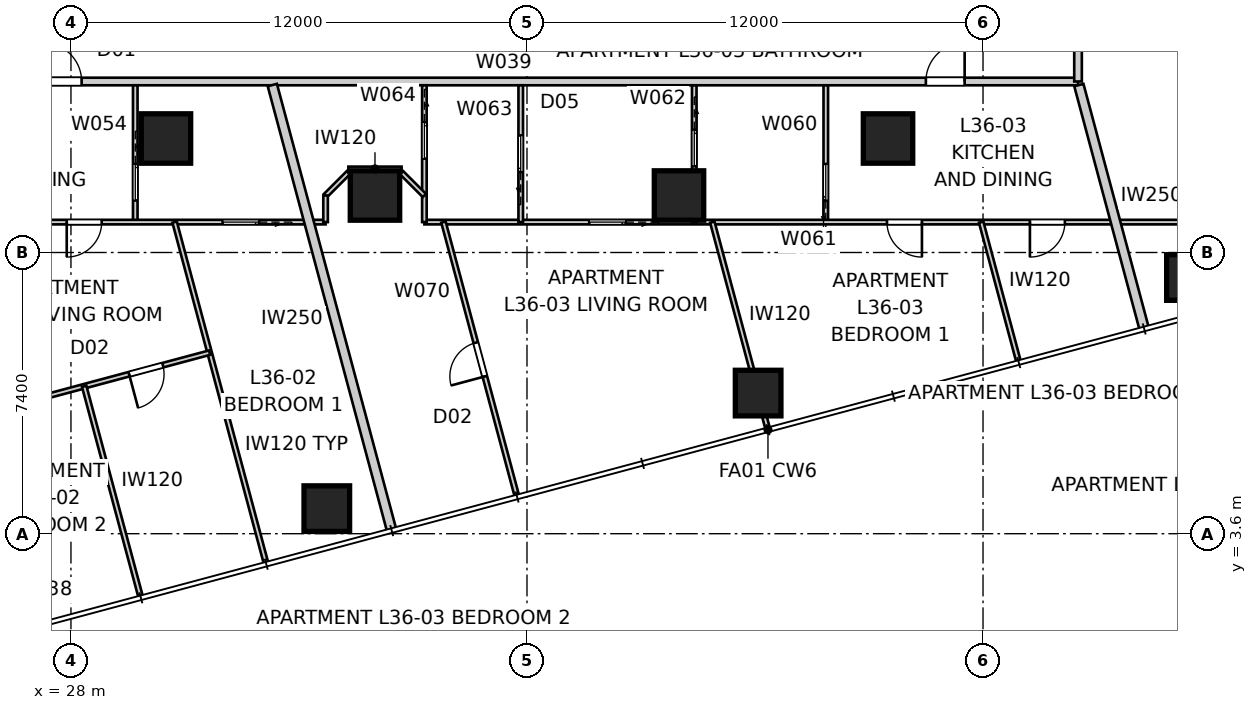
"""IFC4 building model, lengths in metres.
Left out: names, types, materials, properties, quantities, classifications, styles, units other than length and angle.
Written with IfcOpenShell. Run it as: python <this file> out.ifc"""

import sys

from ifc_helpers import new_model, si_unit, direction, frame, frame_2d, origin, origin_2d, place, context, subcontext, project, spatial, rectangle, extrude, element, fill, save


model = new_model("IFC4")
c1 = context("Model", 3, precision=1e-05, world=origin(), true_north=direction((0.0, 1.0)))
c2 = subcontext(c1, "Body", "Model", "MODEL_VIEW")
j1 = project(units=[si_unit("LENGTHUNIT", "METRE"), si_unit("PLANEANGLEUNIT", "RADIAN")], contexts=[c1])
p1 = place(None, origin())
s1 = spatial("IfcSite", under=j1, at=p1, CompositionType="ELEMENT")
p2 = place(p1, origin())
s2 = spatial("IfcBuilding", under=s1, at=p2, CompositionType="ELEMENT")
p3 = place(p2, frame((0.0, 0.0, 132.0)))
s3 = spatial("IfcBuildingStorey", under=s2, at=p3, CompositionType="ELEMENT", Elevation=132.0)
for number, where, z_axis, x_axis in (
    (1, (34.733, 4.26, 0.0), (0.0, 0.0, 1.0), (1.0, 0.0, 0.0)),
    (2, (46.082, 7.301, 0.0), (0.0, 0.0, 1.0), (1.0, 0.0, 0.0)),
    (3, (57.432, 10.342, 0.0), (0.0, 0.0, 1.0), (1.0, 0.0, 0.0)),
):
    element("IfcColumn", number, at=place(p3, frame(where, z_axis=z_axis, x_axis=x_axis)), inside=s3, PredefinedType="COLUMN", context=c2, shape_type="SweptSolid", body=[
        extrude(rectangle(XDim=1.2, YDim=1.2, at=origin_2d()), origin(), (0.0, 0.0, 1.0), 3.4),
    ])
for number, where, z_axis, x_axis in (
    (4, (30.5, 14.0, 0.0), (0.0, 0.0, 1.0), (1.0, 0.0, 0.0)),
    (5, (36.0, 12.5, 0.0), (0.0, 0.0, 1.0), (1.0, 0.0, 0.0)),
    (6, (44.0, 12.5, 0.0), (0.0, 0.0, 1.0), (1.0, 0.0, 0.0)),
    (7, (49.5, 14.0, 0.0), (0.0, 0.0, 1.0), (1.0, 0.0, 0.0)),
):
    element("IfcColumn", number, at=place(p3, frame(where, z_axis=z_axis, x_axis=x_axis)), inside=s3, PredefinedType="COLUMN", context=c2, shape_type="SweptSolid", body=[
        extrude(rectangle(XDim=1.3, YDim=1.3, at=origin_2d()), origin(), (0.0, 0.0, 1.0), 3.4),
    ])
p4 = place(p3, frame((25.5, 15.5, 0.0), z_axis=(0.0, 0.0, 1.0), x_axis=(1.0, 0.0, 0.0)))
e8 = element("IfcWall", 8, at=p4, inside=s3, PredefinedType="PARTITIONING", context=c2, shape_type="SweptSolid", body=[
    extrude(rectangle(XDim=29.0, YDim=0.2, at=frame_2d((14.5, 0.0))), origin(), (0.0, 0.0, 1.0), 3.25),
])
p5 = place(p4, frame((24.996, 0.0, 0.0)))
e9 = element("IfcOpeningElement", 9, at=p5, cuts=e8, PredefinedType="OPENING", context=c2, shape_type="SweptSolid", body=[
    extrude(rectangle(XDim=1.02, YDim=2.1, at=frame_2d((0.51, 1.05))), frame((0.0, 0.11, 0.0), z_axis=(0.0, -1.0, 0.0), x_axis=(1.0, 0.0, 0.0)), (0.0, 0.0, 1.0), 0.22),
])
p6 = place(p4, frame((1.761, 0.0, 0.0)))
e10 = element("IfcOpeningElement", 10, at=p6, cuts=e8, PredefinedType="OPENING", context=c2, shape_type="SweptSolid", body=[
    extrude(rectangle(XDim=1.02, YDim=2.34, at=frame_2d((0.51, 1.17))), frame((0.0, 0.11, 0.0), z_axis=(0.0, -1.0, 0.0), x_axis=(1.0, 0.0, 0.0)), (0.0, 0.0, 1.0), 0.22),
])
p7 = place(p3, frame((54.5, 15.5, 0.0), z_axis=(0.0, 0.0, 1.0), x_axis=(0.0, 1.0, 0.0)))
e11 = element("IfcWall", 11, at=p7, inside=s3, PredefinedType="PARTITIONING", context=c2, shape_type="SweptSolid", body=[
    extrude(rectangle(XDim=28.2, YDim=0.2, at=frame_2d((14.1, 0.0))), origin(), (0.0, 0.0, 1.0), 3.25),
])
p8 = place(p7, frame((21.527, 0.0, 0.0)))
e12 = element("IfcOpeningElement", 12, at=p8, cuts=e11, PredefinedType="OPENING", context=c2, shape_type="SweptSolid", body=[
    extrude(rectangle(XDim=1.02, YDim=2.34, at=frame_2d((0.51, 1.17))), frame((0.0, 0.11, 0.0), z_axis=(0.0, -1.0, 0.0), x_axis=(1.0, 0.0, 0.0)), (0.0, 0.0, 1.0), 0.22),
])
p9 = place(p7, frame((3.256, 0.0, 0.0)))
e13 = element("IfcOpeningElement", 13, at=p9, cuts=e11, PredefinedType="OPENING", context=c2, shape_type="SweptSolid", body=[
    extrude(rectangle(XDim=1.02, YDim=2.1, at=frame_2d((0.51, 1.05))), frame((0.0, 0.11, 0.0), z_axis=(0.0, -1.0, 0.0), x_axis=(1.0, 0.0, 0.0)), (0.0, 0.0, 1.0), 0.22),
])
p10 = place(p7, frame((26.127, 0.0, 0.0)))
e14 = element("IfcOpeningElement", 14, at=p10, cuts=e11, PredefinedType="OPENING", context=c2, shape_type="SweptSolid", body=[
    extrude(rectangle(XDim=1.02, YDim=2.34, at=frame_2d((0.51, 1.17))), frame((0.0, 0.11, 0.0), z_axis=(0.0, -1.0, 0.0), x_axis=(1.0, 0.0, 0.0)), (0.0, 0.0, 1.0), 0.22),
])
p11 = place(p3, frame((36.44, 3.682, 0.0), z_axis=(0.0, 0.0, 1.0), x_axis=(-0.258824223352, 0.965924438766, 0.0)))
e15 = element("IfcWall", 15, at=p11, inside=s3, PredefinedType="PARTITIONING", context=c2, shape_type="SweptSolid", body=[
    extrude(rectangle(XDim=12.138, YDim=0.25, at=frame_2d((6.069, 0.0))), origin(), (0.0, 0.0, 1.0), 3.25),
])
p12 = place(p3, frame((56.242, 8.988, 0.0), z_axis=(0.0, 0.0, 1.0), x_axis=(-0.25880587229, 0.965929355837, 0.0)))
e16 = element("IfcWall", 16, at=p12, inside=s3, PredefinedType="PARTITIONING", context=c2, shape_type="SweptSolid", body=[
    extrude(rectangle(XDim=6.645, YDim=0.25, at=frame_2d((3.322, 0.0))), origin(), (0.0, 0.0, 1.0), 3.25),
])
p13 = place(p3, frame((29.692, 15.4, 0.0), z_axis=(0.0, 0.0, 1.0), x_axis=(0.0, -1.0, 0.0)))
e17 = element("IfcWall", 17, at=p13, inside=s3, PredefinedType="PARTITIONING", context=c2, shape_type="SweptSolid", body=[
    extrude(rectangle(XDim=3.6, YDim=0.12, at=frame_2d((1.8, 0.0))), origin(), (0.0, 0.0, 1.0), 3.25),
])
p14 = place(p13, frame((2.07, 0.0, 0.0)))
e18 = element("IfcOpeningElement", 18, at=p14, cuts=e17, PredefinedType="OPENING", context=c2, shape_type="SweptSolid", body=[
    extrude(rectangle(XDim=0.96, YDim=2.1, at=frame_2d((0.48, 1.05))), frame((0.0, 0.07, 0.0), z_axis=(0.0, -1.0, 0.0), x_axis=(1.0, 0.0, 0.0)), (0.0, 0.0, 1.0), 0.14),
])
p15 = place(p3, frame((34.7, 11.8, 0.0), z_axis=(0.0, 0.0, 1.0), x_axis=(-1.0, 0.0, 0.0)))
e19 = element("IfcWall", 19, at=p15, inside=s3, PredefinedType="PARTITIONING", context=c2, shape_type="SweptSolid", body=[
    extrude(rectangle(XDim=12.9, YDim=0.12, at=frame_2d((6.45, 0.0))), origin(), (0.0, 0.0, 1.0), 2.637),
])
p16 = place(p15, frame((11.294, 0.0, 0.0)))
e20 = element("IfcOpeningElement", 20, at=p16, cuts=e19, PredefinedType="OPENING", context=c2, shape_type="SweptSolid", body=[
    extrude(rectangle(XDim=0.92, YDim=2.34, at=frame_2d((0.46, 1.17))), frame((0.0, 0.07, 0.0), z_axis=(0.0, -1.0, 0.0), x_axis=(1.0, 0.0, 0.0)), (0.0, 0.0, 1.0), 0.14),
])
p17 = place(p15, frame((5.891, 0.0, 0.0)))
e21 = element("IfcOpeningElement", 21, at=p17, cuts=e19, PredefinedType="OPENING", context=c2, shape_type="SweptSolid", body=[
    extrude(rectangle(XDim=0.92, YDim=2.34, at=frame_2d((0.46, 1.17))), frame((0.0, 0.07, 0.0), z_axis=(0.0, -1.0, 0.0), x_axis=(1.0, 0.0, 0.0)), (0.0, 0.0, 1.0), 0.14),
])
p18 = place(p15, frame((1.75, 0.0, 0.0)))
e22 = element("IfcOpeningElement", 22, at=p18, cuts=e19, PredefinedType="OPENING", context=c2, shape_type="SweptSolid", body=[
    extrude(rectangle(XDim=0.96, YDim=2.1, at=frame_2d((0.48, 1.05))), frame((0.0, 0.07, 0.0), z_axis=(0.0, -1.0, 0.0), x_axis=(1.0, 0.0, 0.0)), (0.0, 0.0, 1.0), 0.14),
])
p19 = place(p3, frame((30.728, 11.8, 0.0), z_axis=(0.0, 0.0, 1.0), x_axis=(0.258818491613, -0.965925974596, 0.0)))
e23 = element("IfcWall", 23, at=p19, inside=s3, PredefinedType="PARTITIONING", context=c2, shape_type="SweptSolid", body=[
    extrude(rectangle(XDim=9.28, YDim=0.12, at=frame_2d((4.64, 0.0))), origin(), (0.0, 0.0, 1.0), 2.721),
])
p20 = place(p3, frame((31.648, 8.365, 0.0), z_axis=(0.0, 0.0, 1.0), x_axis=(-0.965925636365, -0.258819753906, 0.0)))
e24 = element("IfcWall", 24, at=p20, inside=s3, PredefinedType="PARTITIONING", context=c2, shape_type="SweptSolid", body=[
    extrude(rectangle(XDim=10.793, YDim=0.12, at=frame_2d((5.396, 0.0))), origin(), (0.0, 0.0, 1.0), 3.25),
])
p21 = place(p20, frame((6.64, 0.0, 0.0)))
e25 = element("IfcOpeningElement", 25, at=p21, cuts=e24, PredefinedType="OPENING", context=c2, shape_type="SweptSolid", body=[
    extrude(rectangle(XDim=0.92, YDim=2.34, at=frame_2d((0.46, 1.17))), frame((0.0, 0.07, 0.0), z_axis=(0.0, -1.0, 0.0), x_axis=(1.0, 0.0, 0.0)), (0.0, 0.0, 1.0), 0.14),
])
p22 = place(p20, frame((1.273, 0.0, 0.0)))
e26 = element("IfcOpeningElement", 26, at=p22, cuts=e24, PredefinedType="OPENING", context=c2, shape_type="SweptSolid", body=[
    extrude(rectangle(XDim=0.92, YDim=2.34, at=frame_2d((0.46, 1.17))), frame((0.0, 0.07, 0.0), z_axis=(0.0, -1.0, 0.0), x_axis=(1.0, 0.0, 0.0)), (0.0, 0.0, 1.0), 0.14),
])
p23 = place(p3, frame((28.348, 7.48, 0.0), z_axis=(0.0, 0.0, 1.0), x_axis=(0.258830607795, -0.965922728001, 0.0)))
e27 = element("IfcWall", 27, at=p23, inside=s3, PredefinedType="PARTITIONING", context=c2, shape_type="SweptSolid", body=[
    extrude(rectangle(XDim=5.724, YDim=0.12, at=frame_2d((2.862, 0.0))), origin(), (0.0, 0.0, 1.0), 3.25),
])
p24 = place(p3, frame((47.862, 11.8, 0.0), z_axis=(0.0, 0.0, 1.0), x_axis=(0.0, 1.0, 0.0)))
e28 = element("IfcWall", 28, at=p24, inside=s3, PredefinedType="PARTITIONING", context=c2, shape_type="SweptSolid", body=[
    extrude(rectangle(XDim=3.6, YDim=0.12, at=frame_2d((1.8, 0.0))), origin(), (0.0, 0.0, 1.0), 3.25),
])
p25 = place(p24, frame((0.57, 0.0, 0.0)))
e29 = element("IfcOpeningElement", 29, at=p25, cuts=e28, PredefinedType="OPENING", context=c2, shape_type="SweptSolid", body=[
    extrude(rectangle(XDim=0.96, YDim=2.1, at=frame_2d((0.48, 1.05))), frame((0.0, 0.07, 0.0), z_axis=(0.0, -1.0, 0.0), x_axis=(1.0, 0.0, 0.0)), (0.0, 0.0, 1.0), 0.14),
])
p26 = place(p3, frame((58.2, 11.8, 0.0), z_axis=(0.0, 0.0, 1.0), x_axis=(-1.0, 0.0, 0.0)))
e30 = element("IfcWall", 30, at=p26, inside=s3, PredefinedType="PARTITIONING", context=c2, shape_type="SweptSolid", body=[
    extrude(rectangle(XDim=20.9, YDim=0.12, at=frame_2d((10.45, 0.0))), origin(), (0.0, 0.0, 1.0), 3.25),
])
p27 = place(p26, frame((7.807, 0.0, 0.0)))
e31 = element("IfcOpeningElement", 31, at=p27, cuts=e30, PredefinedType="OPENING", context=c2, shape_type="SweptSolid", body=[
    extrude(rectangle(XDim=0.92, YDim=2.34, at=frame_2d((0.46, 1.17))), frame((0.0, 0.07, 0.0), z_axis=(0.0, -1.0, 0.0), x_axis=(1.0, 0.0, 0.0)), (0.0, 0.0, 1.0), 0.14),
])
p28 = place(p26, frame((4.046, 0.0, 0.0)))
e32 = element("IfcOpeningElement", 32, at=p28, cuts=e30, PredefinedType="OPENING", context=c2, shape_type="SweptSolid", body=[
    extrude(rectangle(XDim=0.92, YDim=2.34, at=frame_2d((0.46, 1.17))), frame((0.0, 0.07, 0.0), z_axis=(0.0, -1.0, 0.0), x_axis=(1.0, 0.0, 0.0)), (0.0, 0.0, 1.0), 0.14),
])
p29 = place(p26, frame((15.602, 0.0, 0.0)))
e33 = element("IfcOpeningElement", 33, at=p29, cuts=e30, PredefinedType="OPENING", context=c2, shape_type="SweptSolid", body=[
    extrude(rectangle(XDim=0.96, YDim=2.1, at=frame_2d((0.48, 1.05))), frame((0.0, 0.07, 0.0), z_axis=(0.0, -1.0, 0.0), x_axis=(1.0, 0.0, 0.0)), (0.0, 0.0, 1.0), 0.14),
])
p30 = place(p3, frame((44.401, 15.4, 0.0), z_axis=(0.0, 0.0, 1.0), x_axis=(0.0, -1.0, 0.0)))
e34 = element("IfcWall", 34, at=p30, inside=s3, PredefinedType="PARTITIONING", context=c2, shape_type="SweptSolid", body=[
    extrude(rectangle(XDim=3.6, YDim=0.12, at=frame_2d((1.8, 0.0))), origin(), (0.0, 0.0, 1.0), 3.25),
])
p31 = place(p30, frame((1.17, 0.0, 0.0)))
e35 = element("IfcOpeningElement", 35, at=p31, cuts=e34, PredefinedType="OPENING", context=c2, shape_type="SweptSolid", body=[
    extrude(rectangle(XDim=0.96, YDim=2.1, at=frame_2d((0.48, 1.05))), frame((0.0, 0.07, 0.0), z_axis=(0.0, -1.0, 0.0), x_axis=(1.0, 0.0, 0.0)), (0.0, 0.0, 1.0), 0.14),
])
p32 = place(p3, frame((39.835, 11.8, 0.0), z_axis=(0.0, 0.0, 1.0), x_axis=(0.0, 1.0, 0.0)))
e36 = element("IfcWall", 36, at=p32, inside=s3, PredefinedType="PARTITIONING", context=c2, shape_type="SweptSolid", body=[
    extrude(rectangle(XDim=3.6, YDim=0.12, at=frame_2d((1.8, 0.0))), origin(), (0.0, 0.0, 1.0), 3.25),
])
p33 = place(p32, frame((1.32, 0.0, 0.0)))
e37 = element("IfcOpeningElement", 37, at=p33, cuts=e36, PredefinedType="OPENING", context=c2, shape_type="SweptSolid", body=[
    extrude(rectangle(XDim=0.96, YDim=2.1, at=frame_2d((0.48, 1.05))), frame((0.0, 0.07, 0.0), z_axis=(0.0, -1.0, 0.0), x_axis=(1.0, 0.0, 0.0)), (0.0, 0.0, 1.0), 0.14),
])
p34 = place(p3, frame((37.3, 15.4, 0.0), z_axis=(0.0, 0.0, 1.0), x_axis=(0.0, -1.0, 0.0)))
e38 = element("IfcWall", 38, at=p34, inside=s3, PredefinedType="PARTITIONING", context=c2, shape_type="SweptSolid", body=[
    extrude(rectangle(XDim=3.6, YDim=0.12, at=frame_2d((1.8, 0.0))), origin(), (0.0, 0.0, 1.0), 3.25),
])
p35 = place(p34, frame((0.97, 0.0, 0.0)))
e39 = element("IfcOpeningElement", 39, at=p35, cuts=e38, PredefinedType="OPENING", context=c2, shape_type="SweptSolid", body=[
    extrude(rectangle(XDim=0.96, YDim=2.1, at=frame_2d((0.48, 1.05))), frame((0.0, 0.07, 0.0), z_axis=(0.0, -1.0, 0.0), x_axis=(1.0, 0.0, 0.0)), (0.0, 0.0, 1.0), 0.14),
])
p36 = place(p3, frame((37.3, 12.5, 0.0), z_axis=(0.0, 0.0, 1.0), x_axis=(-0.707106781187, 0.707106781187, 0.0)))
e40 = element("IfcWall", 40, at=p36, inside=s3, PredefinedType="PARTITIONING", context=c2, shape_type="SweptSolid", body=[
    extrude(rectangle(XDim=0.849, YDim=0.12, at=frame_2d((0.424, 0.0))), origin(), (0.0, 0.0, 1.0), 3.25),
])
p37 = place(p3, frame((36.7, 13.2, 0.0), z_axis=(0.0, 0.0, 1.0), x_axis=(-1.0, 0.0, 0.0)))
e41 = element("IfcWall", 41, at=p37, inside=s3, PredefinedType="PARTITIONING", context=c2, shape_type="SweptSolid", body=[
    extrude(rectangle(XDim=1.4, YDim=0.12, at=frame_2d((0.7, 0.0))), origin(), (0.0, 0.0, 1.0), 3.25),
])
p38 = place(p3, frame((35.3, 13.1, 0.0), z_axis=(0.0, 0.0, 1.0), x_axis=(-0.707106781187, -0.707106781187, 0.0)))
e42 = element("IfcWall", 42, at=p38, inside=s3, PredefinedType="PARTITIONING", context=c2, shape_type="SweptSolid", body=[
    extrude(rectangle(XDim=0.849, YDim=0.12, at=frame_2d((0.424, 0.0))), origin(), (0.0, 0.0, 1.0), 3.25),
])
p39 = place(p3, frame((34.7, 12.5, 0.0), z_axis=(0.0, 0.0, 1.0), x_axis=(0.0, -1.0, 0.0)))
e43 = element("IfcWall", 43, at=p39, inside=s3, PredefinedType="PARTITIONING", context=c2, shape_type="SweptSolid", body=[
    extrude(rectangle(XDim=0.7, YDim=0.12, at=frame_2d((0.35, 0.0))), origin(), (0.0, 0.0, 1.0), 2.721),
])
p40 = place(p3, frame((44.877, 11.8, 0.0), z_axis=(0.0, 0.0, 1.0), x_axis=(0.258830937246, -0.96592263972, 0.0)))
e44 = element("IfcWall", 44, at=p40, inside=s3, PredefinedType="PARTITIONING", context=c2, shape_type="SweptSolid", body=[
    extrude(rectangle(XDim=5.618, YDim=0.12, at=frame_2d((2.809, 0.0))), origin(), (0.0, 0.0, 1.0), 3.25),
])
p41 = place(p3, frame((39.73, 4.605, 0.0), z_axis=(0.0, 0.0, 1.0), x_axis=(-0.258819087933, 0.965925814813, 0.0)))
e45 = element("IfcWall", 45, at=p41, inside=s3, PredefinedType="PARTITIONING", context=c2, shape_type="SweptSolid", body=[
    extrude(rectangle(XDim=7.449, YDim=0.12, at=frame_2d((3.725, 0.0))), origin(), (0.0, 0.0, 1.0), 3.25),
])
p42 = place(p41, frame((3.244, 0.0, 0.0)))
e46 = element("IfcOpeningElement", 46, at=p42, cuts=e45, PredefinedType="OPENING", context=c2, shape_type="SweptSolid", body=[
    extrude(rectangle(XDim=0.92, YDim=2.34, at=frame_2d((0.46, 1.17))), frame((0.0, 0.07, 0.0), z_axis=(0.0, -1.0, 0.0), x_axis=(1.0, 0.0, 0.0)), (0.0, 0.0, 1.0), 0.14),
])
p43 = place(p3, frame((51.951, 11.8, 0.0), z_axis=(0.0, 0.0, 1.0), x_axis=(0.258777977267, -0.965936829447, 0.0)))
e47 = element("IfcWall", 47, at=p43, inside=s3, PredefinedType="PARTITIONING", context=c2, shape_type="SweptSolid", body=[
    extrude(rectangle(XDim=3.787, YDim=0.12, at=frame_2d((1.894, 0.0))), origin(), (0.0, 0.0, 1.0), 3.25),
])
p44 = place(p5, origin())
e48 = element("IfcDoor", 48, at=p44, inside=s3, OperationType="SINGLE_SWING_RIGHT", PredefinedType="DOOR", context=c2, shape_type="SweptSolid", body=[
    extrude(rectangle(XDim=1.02, YDim=2.1, at=frame_2d((0.51, 1.05))), frame((0.0, 0.025, 0.0), z_axis=(0.0, -1.0, 0.0), x_axis=(1.0, 0.0, 0.0)), (0.0, 0.0, 1.0), 0.05),
])
fill(e9, e48)
p45 = place(p6, origin())
e49 = element("IfcDoor", 49, at=p45, inside=s3, OperationType="SINGLE_SWING_LEFT", PredefinedType="DOOR", context=c2, shape_type="SweptSolid", body=[
    extrude(rectangle(XDim=1.02, YDim=2.34, at=frame_2d((0.51, 1.17))), frame((0.0, 0.025, 0.0), z_axis=(0.0, -1.0, 0.0), x_axis=(1.0, 0.0, 0.0)), (0.0, 0.0, 1.0), 0.05),
])
fill(e10, e49)
p46 = place(p27, origin())
e50 = element("IfcDoor", 50, at=p46, inside=s3, OperationType="SINGLE_SWING_LEFT", PredefinedType="DOOR", context=c2, shape_type="SweptSolid", body=[
    extrude(rectangle(XDim=0.92, YDim=2.34, at=frame_2d((0.46, 1.17))), frame((0.0, 0.025, 0.0), z_axis=(0.0, -1.0, 0.0), x_axis=(1.0, 0.0, 0.0)), (0.0, 0.0, 1.0), 0.05),
])
fill(e31, e50)
p47 = place(p25, origin())
e51 = element("IfcDoor", 51, at=p47, inside=s3, OperationType="SLIDING_TO_LEFT", PredefinedType="DOOR", context=c2, shape_type="SweptSolid", body=[
    extrude(rectangle(XDim=0.96, YDim=2.1, at=frame_2d((0.48, 1.05))), frame((0.0, 0.025, 0.0), z_axis=(0.0, -1.0, 0.0), x_axis=(1.0, 0.0, 0.0)), (0.0, 0.0, 1.0), 0.05),
])
fill(e29, e51)
p48 = place(p28, origin())
e52 = element("IfcDoor", 52, at=p48, inside=s3, OperationType="SINGLE_SWING_RIGHT", PredefinedType="DOOR", context=c2, shape_type="SweptSolid", body=[
    extrude(rectangle(XDim=0.92, YDim=2.34, at=frame_2d((0.46, 1.17))), frame((0.0, 0.025, 0.0), z_axis=(0.0, -1.0, 0.0), x_axis=(1.0, 0.0, 0.0)), (0.0, 0.0, 1.0), 0.05),
])
fill(e32, e52)
p49 = place(p14, origin())
e53 = element("IfcDoor", 53, at=p49, inside=s3, OperationType="SLIDING_TO_LEFT", PredefinedType="DOOR", context=c2, shape_type="SweptSolid", body=[
    extrude(rectangle(XDim=0.96, YDim=2.1, at=frame_2d((0.48, 1.05))), frame((0.0, 0.025, 0.0), z_axis=(0.0, -1.0, 0.0), x_axis=(1.0, 0.0, 0.0)), (0.0, 0.0, 1.0), 0.05),
])
fill(e18, e53)
p50 = place(p17, origin())
e54 = element("IfcDoor", 54, at=p50, inside=s3, OperationType="SINGLE_SWING_RIGHT", PredefinedType="DOOR", context=c2, shape_type="SweptSolid", body=[
    extrude(rectangle(XDim=0.92, YDim=2.34, at=frame_2d((0.46, 1.17))), frame((0.0, 0.025, 0.0), z_axis=(0.0, -1.0, 0.0), x_axis=(1.0, 0.0, 0.0)), (0.0, 0.0, 1.0), 0.05),
])
fill(e21, e54)
p51 = place(p31, origin())
e55 = element("IfcDoor", 55, at=p51, inside=s3, OperationType="SLIDING_TO_LEFT", PredefinedType="DOOR", context=c2, shape_type="SweptSolid", body=[
    extrude(rectangle(XDim=0.96, YDim=2.1, at=frame_2d((0.48, 1.05))), frame((0.0, 0.025, 0.0), z_axis=(0.0, -1.0, 0.0), x_axis=(1.0, 0.0, 0.0)), (0.0, 0.0, 1.0), 0.05),
])
fill(e35, e55)
p52 = place(p18, origin())
e56 = element("IfcDoor", 56, at=p52, inside=s3, OperationType="SLIDING_TO_LEFT", PredefinedType="DOOR", context=c2, shape_type="SweptSolid", body=[
    extrude(rectangle(XDim=0.96, YDim=2.1, at=frame_2d((0.48, 1.05))), frame((0.0, 0.025, 0.0), z_axis=(0.0, -1.0, 0.0), x_axis=(1.0, 0.0, 0.0)), (0.0, 0.0, 1.0), 0.05),
])
fill(e22, e56)
p53 = place(p22, origin())
e57 = element("IfcDoor", 57, at=p53, inside=s3, OperationType="SINGLE_SWING_RIGHT", PredefinedType="DOOR", context=c2, shape_type="SweptSolid", body=[
    extrude(rectangle(XDim=0.92, YDim=2.34, at=frame_2d((0.46, 1.17))), frame((0.0, 0.025, 0.0), z_axis=(0.0, -1.0, 0.0), x_axis=(1.0, 0.0, 0.0)), (0.0, 0.0, 1.0), 0.05),
])
fill(e26, e57)
p54 = place(p29, origin())
e58 = element("IfcDoor", 58, at=p54, inside=s3, OperationType="SLIDING_TO_LEFT", PredefinedType="DOOR", context=c2, shape_type="SweptSolid", body=[
    extrude(rectangle(XDim=0.96, YDim=2.1, at=frame_2d((0.48, 1.05))), frame((0.0, 0.025, 0.0), z_axis=(0.0, -1.0, 0.0), x_axis=(1.0, 0.0, 0.0)), (0.0, 0.0, 1.0), 0.05),
])
fill(e33, e58)
p55 = place(p33, origin())
e59 = element("IfcDoor", 59, at=p55, inside=s3, OperationType="SLIDING_TO_LEFT", PredefinedType="DOOR", context=c2, shape_type="SweptSolid", body=[
    extrude(rectangle(XDim=0.96, YDim=2.1, at=frame_2d((0.48, 1.05))), frame((0.0, 0.025, 0.0), z_axis=(0.0, -1.0, 0.0), x_axis=(1.0, 0.0, 0.0)), (0.0, 0.0, 1.0), 0.05),
])
fill(e37, e59)
p56 = place(p42, origin())
e60 = element("IfcDoor", 60, at=p56, inside=s3, OperationType="SINGLE_SWING_LEFT", PredefinedType="DOOR", context=c2, shape_type="SweptSolid", body=[
    extrude(rectangle(XDim=0.92, YDim=2.34, at=frame_2d((0.46, 1.17))), frame((0.0, 0.025, 0.0), z_axis=(0.0, -1.0, 0.0), x_axis=(1.0, 0.0, 0.0)), (0.0, 0.0, 1.0), 0.05),
])
fill(e46, e60)
p57 = place(p35, origin())
e61 = element("IfcDoor", 61, at=p57, inside=s3, OperationType="SLIDING_TO_LEFT", PredefinedType="DOOR", context=c2, shape_type="SweptSolid", body=[
    extrude(rectangle(XDim=0.96, YDim=2.1, at=frame_2d((0.48, 1.05))), frame((0.0, 0.025, 0.0), z_axis=(0.0, -1.0, 0.0), x_axis=(1.0, 0.0, 0.0)), (0.0, 0.0, 1.0), 0.05),
])
fill(e39, e61)
save(model, sys.argv[1])
